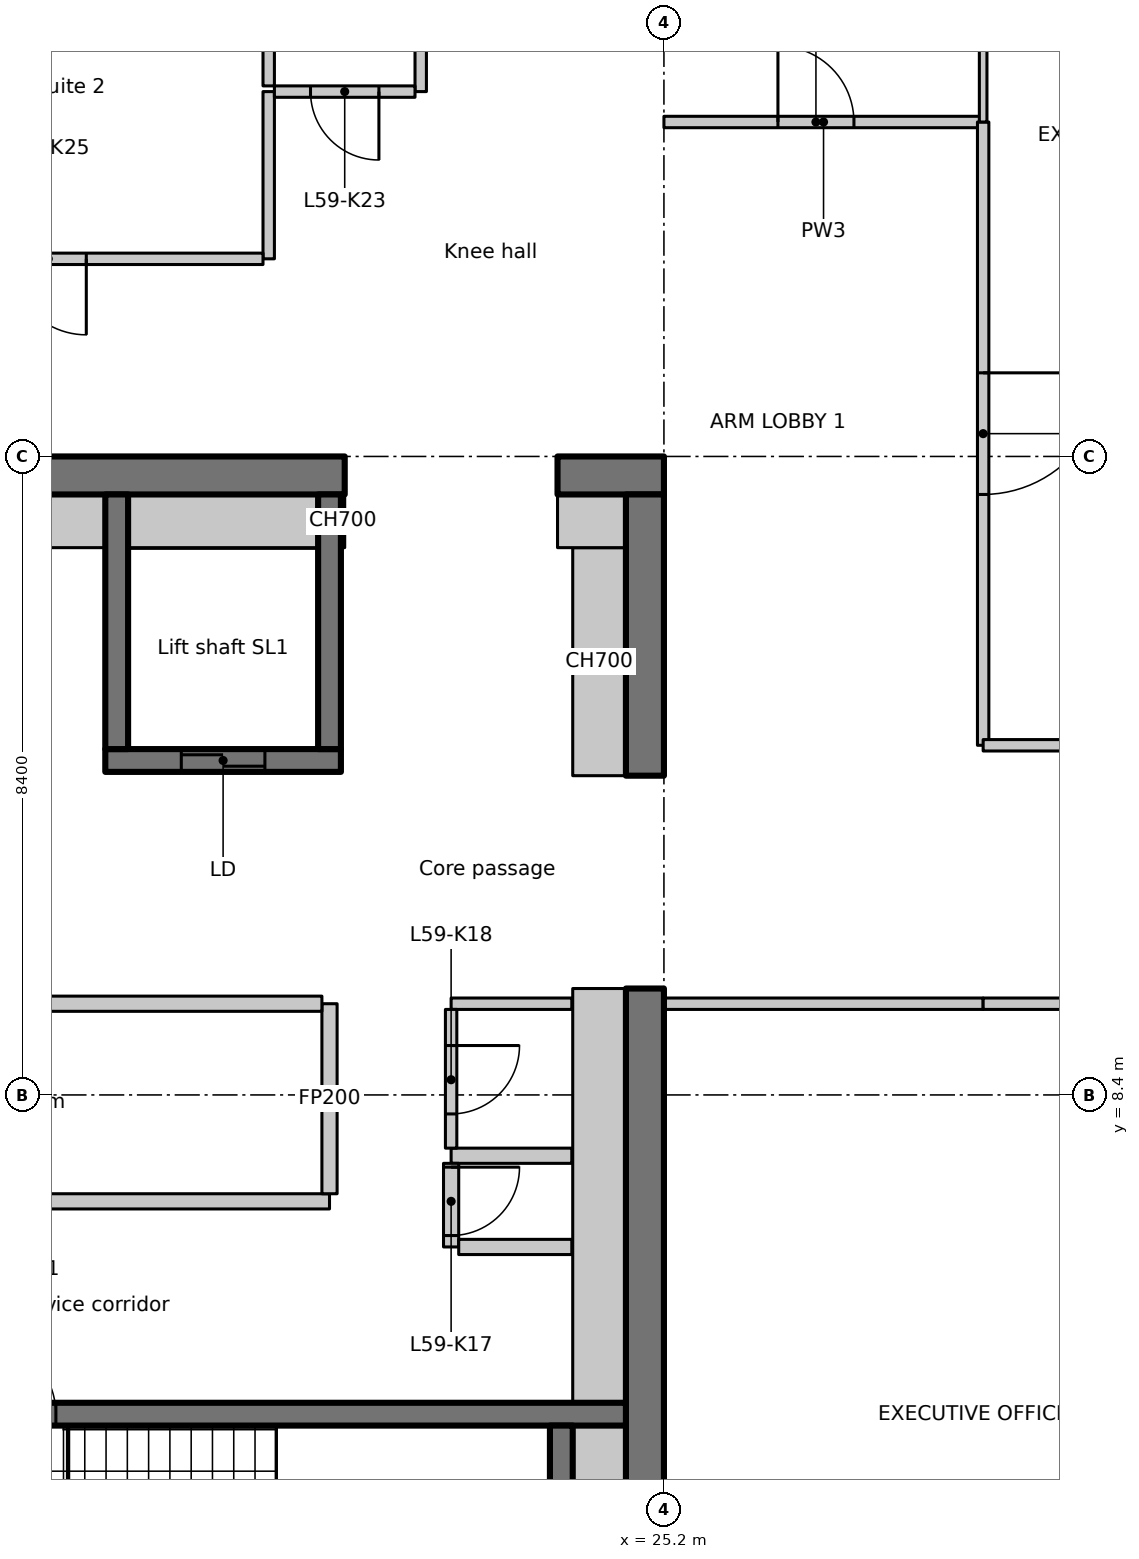
"""IFC4 building model, lengths in metres.
Left out: names, types, materials, properties, quantities, classifications, styles, units other than length and angle.
Written with IfcOpenShell. Run it as: python <this file> out.ifc"""

import sys

from ifc_helpers import new_model, si_unit, direction, frame, frame_2d, origin, place, context, subcontext, project, spatial, polyline, rectangle, outline, extrude, element, fill, save


model = new_model("IFC4")
c1 = context("Model", 3, precision=1e-05, world=origin(), true_north=direction((0.0, 1.0)))
c2 = subcontext(c1, "Body", "Model", "MODEL_VIEW")
j1 = project(units=[si_unit("LENGTHUNIT", "METRE"), si_unit("PLANEANGLEUNIT", "RADIAN")], contexts=[c1])
p1 = place(None, origin())
s1 = spatial("IfcSite", under=j1, at=p1, CompositionType="ELEMENT")
p2 = place(p1, origin())
s2 = spatial("IfcBuilding", under=s1, at=p2, CompositionType="ELEMENT")
p3 = place(p2, frame((0.0, 0.0, 233.7)))
s3 = spatial("IfcBuildingStorey", under=s2, at=p3, CompositionType="ELEMENT", Elevation=233.7)
p4 = place(p3, frame((-1.1, 16.55, 0.0), z_axis=(0.0, 0.0, 1.0), x_axis=(1.0, 0.0, 0.0)))
e1 = element("IfcWall", 1, at=p4, inside=s3, PredefinedType="SHEAR", context=c2, shape_type="SweptSolid", body=[
    extrude(rectangle(XDim=22.1, YDim=0.5, at=frame_2d((11.05, 0.0))), origin(), (0.0, 0.0, 1.0), 3.35),
])
p5 = place(p4, frame((3.15, 0.0, 0.0)))
e2 = element("IfcOpeningElement", 2, at=p5, cuts=e1, PredefinedType="OPENING", context=c2, shape_type="SweptSolid", body=[
    extrude(rectangle(XDim=1.1, YDim=2.3, at=frame_2d((0.55, 1.15))), frame((0.0, 0.26, 0.0), z_axis=(0.0, -1.0, 0.0), x_axis=(1.0, 0.0, 0.0)), (0.0, 0.0, 1.0), 0.52),
])
p6 = place(p3, frame((23.8, 16.55, 0.0), z_axis=(0.0, 0.0, 1.0), x_axis=(1.0, 0.0, 0.0)))
e3 = element("IfcWall", 3, at=p6, inside=s3, PredefinedType="SHEAR", context=c2, shape_type="SweptSolid", body=[
    extrude(rectangle(XDim=1.4, YDim=0.5, at=frame_2d((0.7, 0.0))), origin(), (0.0, 0.0, 1.0), 3.35),
])
p7 = place(p3, frame((24.95, 0.5, 0.0), z_axis=(0.0, 0.0, 1.0), x_axis=(0.0, 1.0, 0.0)))
e4 = element("IfcWall", 4, at=p7, inside=s3, PredefinedType="SHEAR", context=c2, shape_type="SweptSolid", body=[
    extrude(rectangle(XDim=9.3, YDim=0.5, at=frame_2d((4.65, 0.0))), origin(), (0.0, 0.0, 1.0), 3.35),
])
p8 = place(p3, frame((24.95, 12.6, 0.0), z_axis=(0.0, 0.0, 1.0), x_axis=(0.0, 1.0, 0.0)))
e5 = element("IfcWall", 5, at=p8, inside=s3, PredefinedType="SHEAR", context=c2, shape_type="SweptSolid", body=[
    extrude(rectangle(XDim=3.7, YDim=0.5, at=frame_2d((1.85, 0.0))), origin(), (0.0, 0.0, 1.0), 3.35),
])
p9 = place(p3, frame((24.35, 12.6, 0.0), z_axis=(0.0, 0.0, 1.0), x_axis=(0.0, 1.0, 0.0)))
e6 = element("IfcWall", 6, at=p9, inside=s3, PredefinedType="PARTITIONING", context=c2, shape_type="SweptSolid", body=[
    extrude(rectangle(XDim=3.0, YDim=0.7, at=frame_2d((1.5, 0.0))), origin(), (0.0, 0.0, 1.0), 3.35),
])
p10 = place(p3, frame((23.8, 15.95, 0.0), z_axis=(0.0, 0.0, 1.0), x_axis=(1.0, 0.0, 0.0)))
e7 = element("IfcWall", 7, at=p10, inside=s3, PredefinedType="PARTITIONING", context=c2, shape_type="SweptSolid", body=[
    extrude(rectangle(XDim=0.9, YDim=0.7, at=frame_2d((0.45, 0.0))), origin(), (0.0, 0.0, 1.0), 3.35),
])
p11 = place(p3, frame((17.85, 12.8, 0.0), z_axis=(0.0, 0.0, 1.0), x_axis=(1.0, 0.0, 0.0)))
e8 = element("IfcWall", 8, at=p11, inside=s3, PredefinedType="SHEAR", context=c2, shape_type="SweptSolid", body=[
    extrude(rectangle(XDim=3.1, YDim=0.3, at=frame_2d((1.55, 0.0))), origin(), (0.0, 0.0, 1.0), 3.35),
])
p12 = place(p11, frame((1.0, 0.0, 0.0)))
e9 = element("IfcOpeningElement", 9, at=p12, cuts=e8, PredefinedType="OPENING", context=c2, shape_type="SweptSolid", body=[
    extrude(rectangle(XDim=1.1, YDim=2.3, at=frame_2d((0.55, 1.15))), frame((0.0, 0.16, 0.0), z_axis=(0.0, -1.0, 0.0), x_axis=(1.0, 0.0, 0.0)), (0.0, 0.0, 1.0), 0.32),
])
for number, where, z_axis, x_axis in (
    (10, (18.0, 12.95, 0.0), (0.0, 0.0, 1.0), (0.0, 1.0, 0.0)),
    (11, (20.8, 12.95, 0.0), (0.0, 0.0, 1.0), (0.0, 1.0, 0.0)),
):
    element("IfcWall", number, at=place(p3, frame(where, z_axis=z_axis, x_axis=x_axis)), inside=s3, PredefinedType="SHEAR", context=c2, shape_type="SweptSolid", body=[
        extrude(rectangle(XDim=3.35, YDim=0.3, at=frame_2d((1.675, 0.0))), origin(), (0.0, 0.0, 1.0), 3.35),
    ])
p13 = place(p3, frame((15.8, 4.2, 0.0), z_axis=(0.0, 0.0, 1.0), x_axis=(1.0, 0.0, 0.0)))
e12 = element("IfcWall", 12, at=p13, inside=s3, PredefinedType="SHEAR", context=c2, shape_type="SweptSolid", body=[
    extrude(rectangle(XDim=8.9, YDim=0.3, at=frame_2d((4.45, 0.0))), origin(), (0.0, 0.0, 1.0), 3.35),
])
p14 = place(p13, frame((0.4, 0.0, 0.0)))
e13 = element("IfcOpeningElement", 13, at=p14, cuts=e12, PredefinedType="OPENING", context=c2, shape_type="SweptSolid", body=[
    extrude(rectangle(XDim=1.0, YDim=2.1, at=frame_2d((0.5, 1.05))), frame((0.0, 0.16, 0.0), z_axis=(0.0, -1.0, 0.0), x_axis=(1.0, 0.0, 0.0)), (0.0, 0.0, 1.0), 0.32),
])
p15 = place(p3, frame((23.85, 1.5, 0.0), z_axis=(0.0, 0.0, 1.0), x_axis=(0.0, 1.0, 0.0)))
e14 = element("IfcWall", 14, at=p15, inside=s3, PredefinedType="SHEAR", context=c2, shape_type="SweptSolid", body=[
    extrude(rectangle(XDim=2.55, YDim=0.3, at=frame_2d((1.275, 0.0))), origin(), (0.0, 0.0, 1.0), 3.35),
])
p16 = place(p3, frame((12.4, 7.0, 0.0), z_axis=(0.0, 0.0, 1.0), x_axis=(1.0, 0.0, 0.0)))
e15 = element("IfcWall", 15, at=p16, inside=s3, PredefinedType="PARTITIONING", context=c2, shape_type="SweptSolid", body=[
    extrude(rectangle(XDim=8.4, YDim=0.2, at=frame_2d((4.2, 0.0))), origin(), (0.0, 0.0, 1.0), 3.35),
])
p17 = place(p3, frame((20.8, 7.1, 0.0), z_axis=(0.0, 0.0, 1.0), x_axis=(0.0, 1.0, 0.0)))
e16 = element("IfcWall", 16, at=p17, inside=s3, PredefinedType="PARTITIONING", context=c2, shape_type="SweptSolid", body=[
    extrude(rectangle(XDim=2.5, YDim=0.2, at=frame_2d((1.25, 0.0))), origin(), (0.0, 0.0, 1.0), 3.35),
])
p18 = place(p3, frame((20.7, 9.6, 0.0), z_axis=(0.0, 0.0, 1.0), x_axis=(-1.0, 0.0, 0.0)))
e17 = element("IfcWall", 17, at=p18, inside=s3, PredefinedType="PARTITIONING", context=c2, shape_type="SweptSolid", body=[
    extrude(rectangle(XDim=8.3, YDim=0.2, at=frame_2d((4.15, 0.0))), origin(), (0.0, 0.0, 1.0), 3.35),
])
p19 = place(p18, frame((3.65, 0.0, 0.0)))
e18 = element("IfcOpeningElement", 18, at=p19, cuts=e17, PredefinedType="OPENING", context=c2, shape_type="SweptSolid", body=[
    extrude(rectangle(XDim=0.9, YDim=2.1, at=frame_2d((0.45, 1.05))), frame((0.0, 0.11, 0.0), z_axis=(0.0, -1.0, 0.0), x_axis=(1.0, 0.0, 0.0)), (0.0, 0.0, 1.0), 0.22),
])
p20 = place(p3, frame((23.988, 7.6, 0.0), z_axis=(0.0, 0.0, 1.0), x_axis=(-1.0, 0.0, 0.0)))
e19 = element("IfcWall", 19, at=p20, inside=s3, PredefinedType="PARTITIONING", context=c2, shape_type="SweptSolid", body=[
    extrude(rectangle(XDim=1.588, YDim=0.2, at=frame_2d((0.794, 0.0))), origin(), (0.0, 0.0, 1.0), 3.35),
])
p21 = place(p3, frame((22.4, 7.5, 0.0), z_axis=(0.0, 0.0, 1.0), x_axis=(0.0, -1.0, 0.0)))
e20 = element("IfcWall", 20, at=p21, inside=s3, PredefinedType="PARTITIONING", context=c2, shape_type="SweptSolid", body=[
    extrude(rectangle(XDim=1.1, YDim=0.2, at=frame_2d((0.55, 0.0))), origin(), (0.0, 0.0, 1.0), 3.35),
])
p22 = place(p21, frame((0.05, 0.0, 0.0)))
e21 = element("IfcOpeningElement", 21, at=p22, cuts=e20, PredefinedType="OPENING", context=c2, shape_type="SweptSolid", body=[
    extrude(rectangle(XDim=0.9, YDim=2.1, at=frame_2d((0.45, 1.05))), frame((0.0, 0.11, 0.0), z_axis=(0.0, -1.0, 0.0), x_axis=(1.0, 0.0, 0.0)), (0.0, 0.0, 1.0), 0.22),
])
p23 = place(p3, frame((22.5, 6.4, 0.0), z_axis=(0.0, 0.0, 1.0), x_axis=(1.0, 0.0, 0.0)))
e22 = element("IfcWall", 22, at=p23, inside=s3, PredefinedType="PARTITIONING", context=c2, shape_type="SweptSolid", body=[
    extrude(rectangle(XDim=1.488, YDim=0.2, at=frame_2d((0.744, 0.0))), origin(), (0.0, 0.0, 1.0), 3.35),
])
p24 = place(p3, frame((20.0, 21.6, 0.0), z_axis=(0.0, 0.0, 1.0), x_axis=(0.0, -1.0, 0.0)))
e23 = element("IfcWall", 23, at=p24, inside=s3, PredefinedType="PARTITIONING", context=c2, shape_type="SweptSolid", body=[
    extrude(rectangle(XDim=2.2, YDim=0.15, at=frame_2d((1.1, 0.0))), origin(), (0.0, 0.0, 1.0), 3.35),
])
p25 = place(p3, frame((19.925, 19.4, 0.0), z_axis=(0.0, 0.0, 1.0), x_axis=(-1.0, 0.0, 0.0)))
e24 = element("IfcWall", 24, at=p25, inside=s3, PredefinedType="PARTITIONING", context=c2, shape_type="SweptSolid", body=[
    extrude(rectangle(XDim=5.725, YDim=0.15, at=frame_2d((2.863, 0.0))), origin(), (0.0, 0.0, 1.0), 3.35),
])
p26 = place(p25, frame((2.325, 0.0, 0.0)))
e25 = element("IfcOpeningElement", 25, at=p26, cuts=e24, PredefinedType="OPENING", context=c2, shape_type="SweptSolid", body=[
    extrude(rectangle(XDim=1.0, YDim=2.1, at=frame_2d((0.5, 1.05))), frame((0.0, 0.085, 0.0), z_axis=(0.0, -1.0, 0.0), x_axis=(1.0, 0.0, 0.0)), (0.0, 0.0, 1.0), 0.17),
])
p27 = place(p3, frame((22.0, 23.925, 0.0), z_axis=(0.0, 0.0, 1.0), x_axis=(0.0, -1.0, 0.0)))
e26 = element("IfcWall", 26, at=p27, inside=s3, PredefinedType="PARTITIONING", context=c2, shape_type="SweptSolid", body=[
    extrude(rectangle(XDim=2.325, YDim=0.15, at=frame_2d((1.163, 0.0))), origin(), (0.0, 0.0, 1.0), 3.35),
])
p28 = place(p3, frame((21.925, 21.6, 0.0), z_axis=(0.0, 0.0, 1.0), x_axis=(-1.0, 0.0, 0.0)))
e27 = element("IfcWall", 27, at=p28, inside=s3, PredefinedType="PARTITIONING", context=c2, shape_type="SweptSolid", body=[
    extrude(rectangle(XDim=1.85, YDim=0.15, at=frame_2d((0.925, 0.0))), origin(), (0.0, 0.0, 1.0), 3.35),
])
p29 = place(p28, frame((0.475, 0.0, 0.0)))
e28 = element("IfcOpeningElement", 28, at=p29, cuts=e27, PredefinedType="OPENING", context=c2, shape_type="SweptSolid", body=[
    extrude(rectangle(XDim=0.9, YDim=2.1, at=frame_2d((0.45, 1.05))), frame((0.0, 0.085, 0.0), z_axis=(0.0, -1.0, 0.0), x_axis=(1.0, 0.0, 0.0)), (0.0, 0.0, 1.0), 0.17),
])
p30 = place(p3, frame((20.0, 21.675, 0.0), z_axis=(0.0, 0.0, 1.0), x_axis=(0.0, 1.0, 0.0)))
e29 = element("IfcWall", 29, at=p30, inside=s3, PredefinedType="PARTITIONING", context=c2, shape_type="SweptSolid", body=[
    extrude(rectangle(XDim=2.15, YDim=0.15, at=frame_2d((1.075, 0.0))), origin(), (0.0, 0.0, 1.0), 3.35),
])
p31 = place(p3, frame((23.988, 9.6, 0.0), z_axis=(0.0, 0.0, 1.0), x_axis=(-1.0, 0.0, 0.0)))
e30 = element("IfcWall", 30, at=p31, inside=s3, PredefinedType="PARTITIONING", context=c2, shape_type="SweptSolid", body=[
    extrude(rectangle(XDim=1.588, YDim=0.15, at=frame_2d((0.794, 0.0))), origin(), (0.0, 0.0, 1.0), 3.35),
])
p32 = place(p3, frame((22.4, 9.525, 0.0), z_axis=(0.0, 0.0, 1.0), x_axis=(0.0, -1.0, 0.0)))
e31 = element("IfcWall", 31, at=p32, inside=s3, PredefinedType="PARTITIONING", context=c2, shape_type="SweptSolid", body=[
    extrude(rectangle(XDim=1.825, YDim=0.15, at=frame_2d((0.913, 0.0))), origin(), (0.0, 0.0, 1.0), 3.35),
])
p33 = place(p32, frame((0.475, 0.0, 0.0)))
e32 = element("IfcOpeningElement", 32, at=p33, cuts=e31, PredefinedType="OPENING", context=c2, shape_type="SweptSolid", body=[
    extrude(rectangle(XDim=0.9, YDim=2.1, at=frame_2d((0.45, 1.05))), frame((0.0, 0.085, 0.0), z_axis=(0.0, -1.0, 0.0), x_axis=(1.0, 0.0, 0.0)), (0.0, 0.0, 1.0), 0.17),
])
for number, where, z_axis, x_axis in (
    (33, (15.35, 15.95, 0.0), (0.0, 0.0, 1.0), (1.0, 0.0, 0.0)),
    (34, (18.15, 15.95, 0.0), (0.0, 0.0, 1.0), (1.0, 0.0, 0.0)),
):
    element("IfcWall", number, at=place(p3, frame(where, z_axis=z_axis, x_axis=x_axis)), inside=s3, PredefinedType="PARTITIONING", context=c2, shape_type="SweptSolid", body=[
        extrude(rectangle(XDim=2.5, YDim=0.7, at=frame_2d((1.25, 0.0))), origin(), (0.0, 0.0, 1.0), 3.35),
    ])
p34 = place(p3, frame((20.95, 15.95, 0.0), z_axis=(0.0, 0.0, 1.0), x_axis=(1.0, 0.0, 0.0)))
e35 = element("IfcWall", 35, at=p34, inside=s3, PredefinedType="PARTITIONING", context=c2, shape_type="SweptSolid", body=[
    extrude(rectangle(XDim=0.05, YDim=0.7, at=frame_2d((0.025, 0.0))), origin(), (0.0, 0.0, 1.0), 3.35),
])
p35 = place(p3, frame((24.35, 1.5, 0.0), z_axis=(0.0, 0.0, 1.0), x_axis=(0.0, 1.0, 0.0)))
e36 = element("IfcWall", 36, at=p35, inside=s3, PredefinedType="PARTITIONING", context=c2, shape_type="SweptSolid", body=[
    extrude(rectangle(XDim=2.55, YDim=0.7, at=frame_2d((1.275, 0.0))), origin(), (0.0, 0.0, 1.0), 3.35),
])
p36 = place(p3, frame((24.35, 4.35, 0.0), z_axis=(0.0, 0.0, 1.0), x_axis=(0.0, 1.0, 0.0)))
e37 = element("IfcWall", 37, at=p36, inside=s3, PredefinedType="PARTITIONING", context=c2, shape_type="SweptSolid", body=[
    extrude(rectangle(XDim=5.45, YDim=0.7, at=frame_2d((2.725, 0.0))), origin(), (0.0, 0.0, 1.0), 3.35),
])
p37 = place(p3, frame((25.2, 21.2, 0.0), z_axis=(0.0, 0.0, 1.0), x_axis=(1.0, 0.0, 0.0)))
e38 = element("IfcWall", 38, at=p37, inside=s3, PredefinedType="PARTITIONING", context=c2, shape_type="SweptSolid", body=[
    extrude(rectangle(XDim=4.2, YDim=0.15, at=frame_2d((2.1, 0.0))), origin(), (0.0, 0.0, 1.0), 3.33),
])
p38 = place(p37, frame((1.5, 0.0, 0.0)))
e39 = element("IfcOpeningElement", 39, at=p38, cuts=e38, PredefinedType="OPENING", context=c2, shape_type="SweptSolid", body=[
    extrude(rectangle(XDim=1.0, YDim=2.1, at=frame_2d((0.5, 1.05))), frame((0.0, 0.085, 0.0), z_axis=(0.0, -1.0, 0.0), x_axis=(1.0, 0.0, 0.0)), (0.0, 0.0, 1.0), 0.17),
])
p39 = place(p3, frame((29.4, 9.6, 0.0), z_axis=(0.0, 0.0, 1.0), x_axis=(-1.0, 0.0, 0.0)))
e40 = element("IfcWall", 40, at=p39, inside=s3, PredefinedType="PARTITIONING", context=c2, shape_type="SweptSolid", body=[
    extrude(rectangle(XDim=4.2, YDim=0.15, at=frame_2d((2.1, 0.0))), origin(), (0.0, 0.0, 1.0), 3.33),
])
p40 = place(p3, frame((29.4, 21.2, 0.0), z_axis=(0.0, 0.0, 1.0), x_axis=(0.0, -1.0, 0.0)))
e41 = element("IfcWall", 41, at=p40, inside=s3, PredefinedType="PARTITIONING", context=c2, shape_type="SweptSolid", body=[
    extrude(rectangle(XDim=8.2, YDim=0.15, at=frame_2d((4.1, 0.0))), origin(), (0.0, 0.0, 1.0), 3.33),
])
p41 = place(p40, frame((3.3, 0.0, 0.0)))
e42 = element("IfcOpeningElement", 42, at=p41, cuts=e41, PredefinedType="OPENING", context=c2, shape_type="SweptSolid", body=[
    extrude(rectangle(XDim=1.6, YDim=2.1, at=frame_2d((0.8, 1.05))), frame((0.0, 0.085, 0.0), z_axis=(0.0, -1.0, 0.0), x_axis=(1.0, 0.0, 0.0)), (0.0, 0.0, 1.0), 0.17),
])
p42 = place(p3, frame((29.4, 27.511, 0.0), z_axis=(0.0, 0.0, 1.0), x_axis=(0.0, -1.0, 0.0)))
e43 = element("IfcWall", 43, at=p42, inside=s3, PredefinedType="PARTITIONING", context=c2, shape_type="SweptSolid", body=[
    extrude(outline(polyline([(0.0, 0.0), (6.311, 0.0), (6.311, 3.33), (2.761, 3.33), (2.759, 2.98), (1.863, 2.98), (1.861, 3.33), (0.236, 3.33), (0.0, 3.33), (0.0, 0.0)])), frame((0.0, 0.05, 0.0), z_axis=(0.0, -1.0, 0.0), x_axis=(1.0, 0.0, 0.0)), (0.0, 0.0, 1.0), 0.1),
])
p43 = place(p3, frame((33.6, 9.6, 0.0), z_axis=(0.0, 0.0, 1.0), x_axis=(-1.0, 0.0, 0.0)))
e44 = element("IfcWall", 44, at=p43, inside=s3, PredefinedType="PARTITIONING", context=c2, shape_type="SweptSolid", body=[
    extrude(rectangle(XDim=4.2, YDim=0.15, at=frame_2d((2.1, 0.0))), origin(), (0.0, 0.0, 1.0), 3.33),
])
p44 = place(p43, frame((1.2, 0.0, 0.0)))
e45 = element("IfcOpeningElement", 45, at=p44, cuts=e44, PredefinedType="OPENING", context=c2, shape_type="SweptSolid", body=[
    extrude(rectangle(XDim=1.6, YDim=2.1, at=frame_2d((0.8, 1.05))), frame((0.0, 0.085, 0.0), z_axis=(0.0, -1.0, 0.0), x_axis=(1.0, 0.0, 0.0)), (0.0, 0.0, 1.0), 0.17),
])
p45 = place(p3, frame((29.4, 13.0, 0.0), z_axis=(0.0, 0.0, 1.0), x_axis=(1.0, 0.0, 0.0)))
e46 = element("IfcWall", 46, at=p45, inside=s3, PredefinedType="PARTITIONING", context=c2, shape_type="SweptSolid", body=[
    extrude(rectangle(XDim=4.2, YDim=0.15, at=frame_2d((2.1, 0.0))), origin(), (0.0, 0.0, 1.0), 3.33),
])
p46 = place(p12, origin())
e47 = element("IfcDoor", 47, at=p46, inside=s3, OperationType="SLIDING_TO_LEFT", PredefinedType="DOOR", context=c2, shape_type="SweptSolid", body=[
    extrude(rectangle(XDim=1.1, YDim=2.3, at=frame_2d((0.55, 1.15))), frame((0.0, 0.025, 0.0), z_axis=(0.0, -1.0, 0.0), x_axis=(1.0, 0.0, 0.0)), (0.0, 0.0, 1.0), 0.05),
])
fill(e9, e47)
p47 = place(p14, origin())
e48 = element("IfcDoor", 48, at=p47, inside=s3, OperationType="SINGLE_SWING_RIGHT", PredefinedType="DOOR", context=c2, shape_type="SweptSolid", body=[
    extrude(rectangle(XDim=1.0, YDim=2.1, at=frame_2d((0.5, 1.05))), frame((0.0, 0.025, 0.0), z_axis=(0.0, -1.0, 0.0), x_axis=(1.0, 0.0, 0.0)), (0.0, 0.0, 1.0), 0.05),
])
fill(e13, e48)
p48 = place(p22, origin())
e49 = element("IfcDoor", 49, at=p48, inside=s3, OperationType="SINGLE_SWING_RIGHT", PredefinedType="DOOR", context=c2, shape_type="SweptSolid", body=[
    extrude(rectangle(XDim=0.9, YDim=2.1, at=frame_2d((0.45, 1.05))), frame((0.0, 0.025, 0.0), z_axis=(0.0, -1.0, 0.0), x_axis=(1.0, 0.0, 0.0)), (0.0, 0.0, 1.0), 0.05),
])
fill(e21, e49)
p49 = place(p33, origin())
e50 = element("IfcDoor", 50, at=p49, inside=s3, OperationType="SINGLE_SWING_LEFT", PredefinedType="DOOR", context=c2, shape_type="SweptSolid", body=[
    extrude(rectangle(XDim=0.9, YDim=2.1, at=frame_2d((0.45, 1.05))), frame((0.0, 0.025, 0.0), z_axis=(0.0, -1.0, 0.0), x_axis=(1.0, 0.0, 0.0)), (0.0, 0.0, 1.0), 0.05),
])
fill(e32, e50)
p50 = place(p29, origin())
e51 = element("IfcDoor", 51, at=p50, inside=s3, OperationType="SINGLE_SWING_RIGHT", PredefinedType="DOOR", context=c2, shape_type="SweptSolid", body=[
    extrude(rectangle(XDim=0.9, YDim=2.1, at=frame_2d((0.45, 1.05))), frame((0.0, 0.025, 0.0), z_axis=(0.0, -1.0, 0.0), x_axis=(1.0, 0.0, 0.0)), (0.0, 0.0, 1.0), 0.05),
])
fill(e28, e51)
p51 = place(p26, origin())
e52 = element("IfcDoor", 52, at=p51, inside=s3, OperationType="SINGLE_SWING_RIGHT", PredefinedType="DOOR", context=c2, shape_type="SweptSolid", body=[
    extrude(rectangle(XDim=1.0, YDim=2.1, at=frame_2d((0.5, 1.05))), frame((0.0, 0.025, 0.0), z_axis=(0.0, -1.0, 0.0), x_axis=(1.0, 0.0, 0.0)), (0.0, 0.0, 1.0), 0.05),
])
fill(e25, e52)
p52 = place(p38, origin())
e53 = element("IfcDoor", 53, at=p52, inside=s3, OperationType="SINGLE_SWING_LEFT", PredefinedType="DOOR", context=c2, shape_type="SweptSolid", body=[
    extrude(rectangle(XDim=1.0, YDim=2.1, at=frame_2d((0.5, 1.05))), frame((0.0, 0.025, 0.0), z_axis=(0.0, -1.0, 0.0), x_axis=(1.0, 0.0, 0.0)), (0.0, 0.0, 1.0), 0.05),
])
fill(e39, e53)
p53 = place(p41, origin())
e54 = element("IfcDoor", 54, at=p53, inside=s3, OperationType="DOUBLE_DOOR_SINGLE_SWING", PredefinedType="DOOR", context=c2, shape_type="SweptSolid", body=[
    extrude(rectangle(XDim=1.6, YDim=2.1, at=frame_2d((0.8, 1.05))), frame((0.0, 0.025, 0.0), z_axis=(0.0, -1.0, 0.0), x_axis=(1.0, 0.0, 0.0)), (0.0, 0.0, 1.0), 0.05),
])
fill(e42, e54)
save(model, sys.argv[1])
